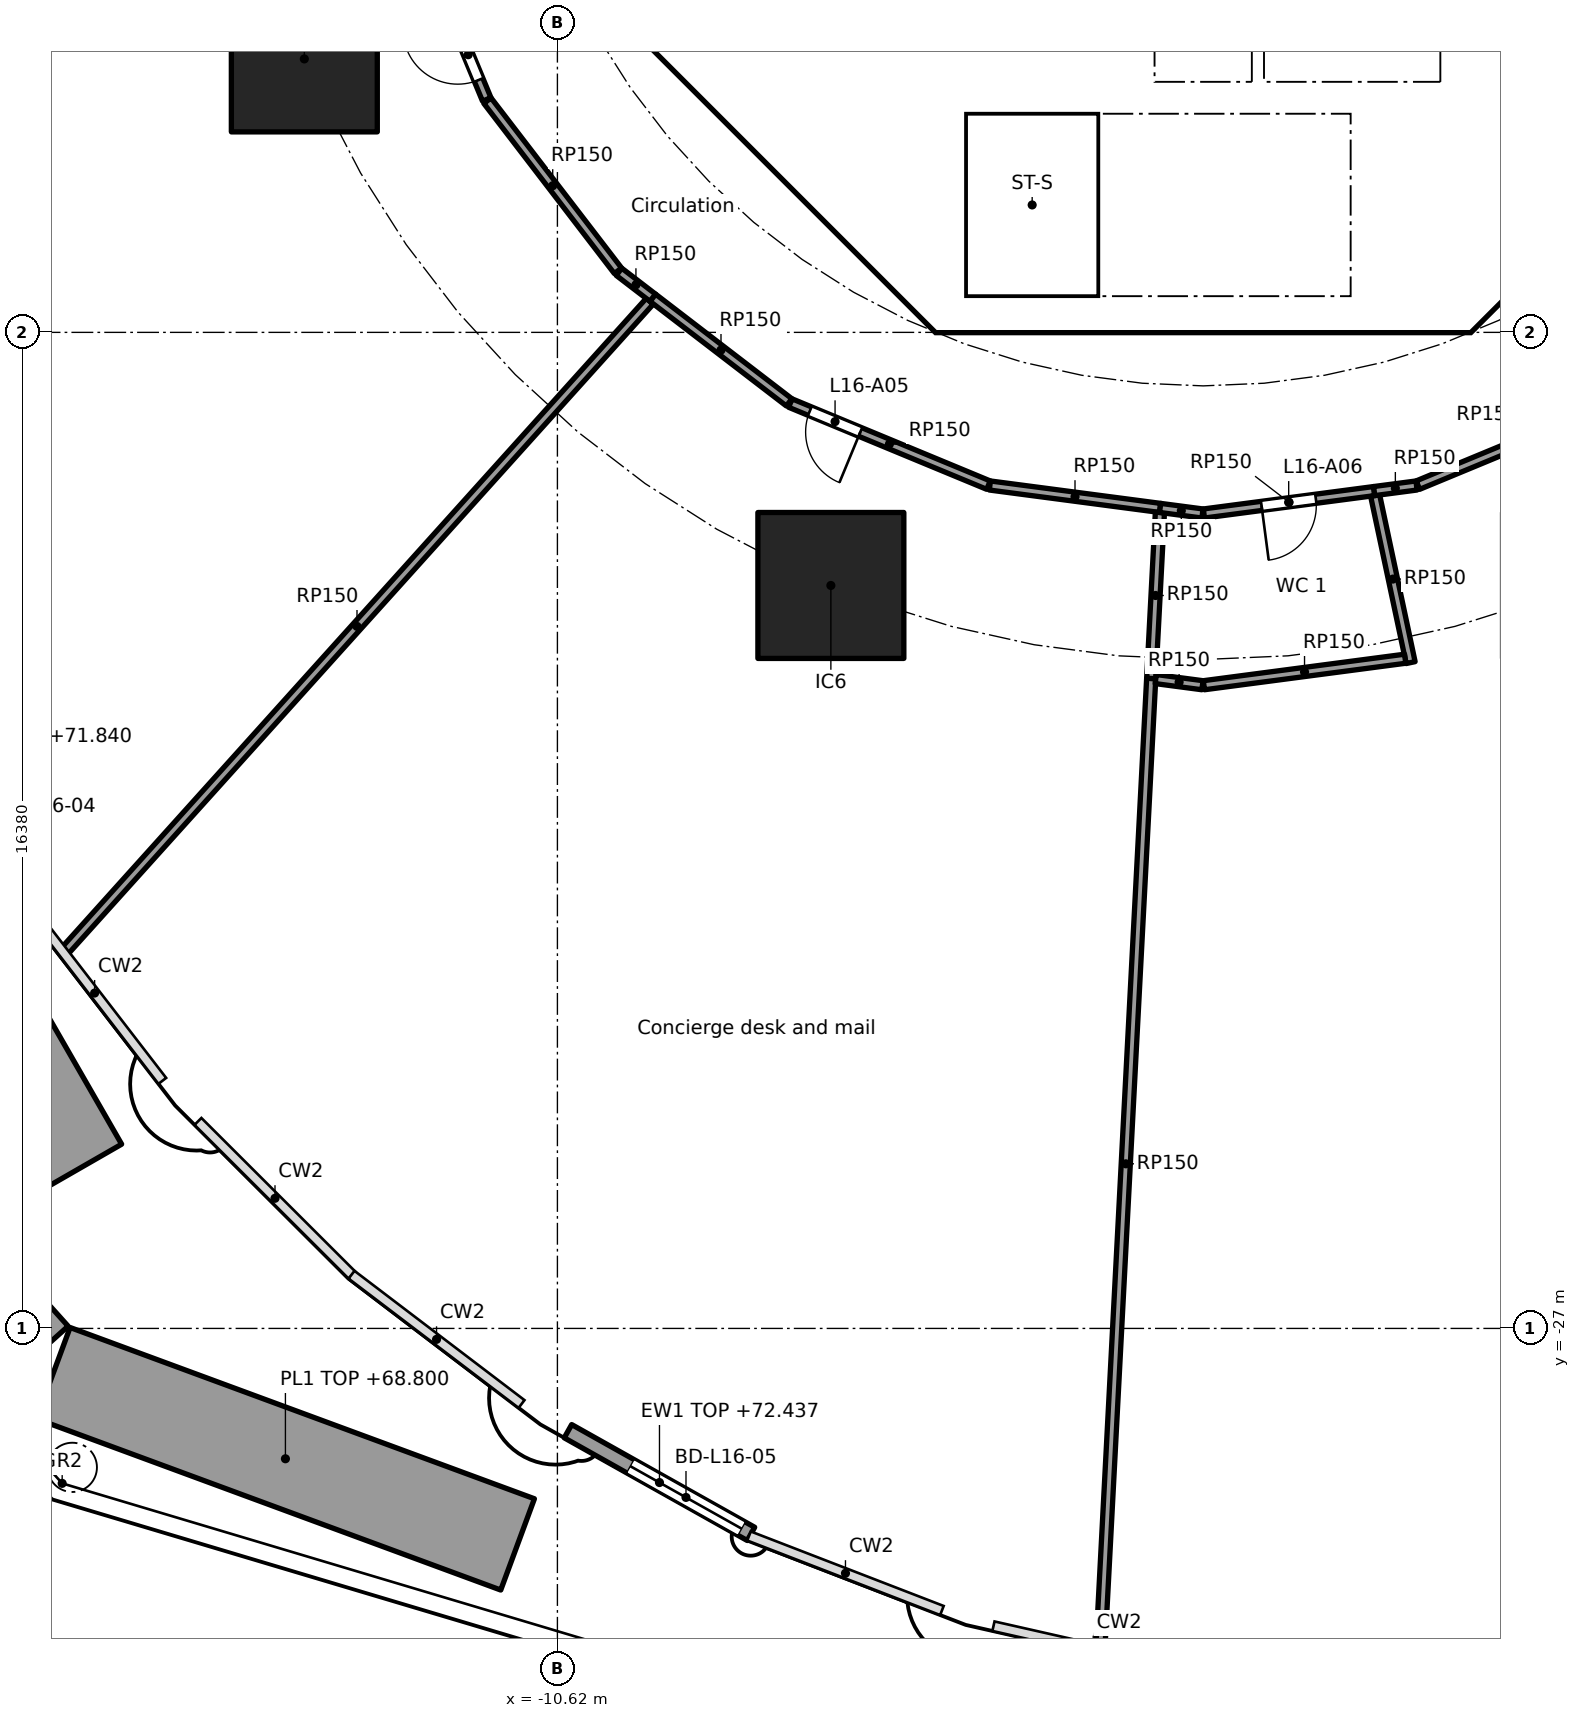
"""IFC4 building model, lengths in metres.
Left out: names, types, materials, properties, quantities, classifications, styles, units other than length and angle.
Written with IfcOpenShell. Run it as: python <this file> out.ifc"""

import sys

from ifc_helpers import new_model, si_unit, direction, frame, frame_2d, origin, origin_2d, place, context, subcontext, project, spatial, polyline, rectangle, outline, extrude, element, fill, save


model = new_model("IFC4")
c1 = context("Model", 3, precision=1e-05, world=origin(), true_north=direction((0.0, 1.0)))
c2 = subcontext(c1, "Body", "Model", "MODEL_VIEW")
j1 = project(units=[si_unit("LENGTHUNIT", "METRE"), si_unit("PLANEANGLEUNIT", "RADIAN")], contexts=[c1])
p1 = place(None, origin())
s1 = spatial("IfcSite", under=j1, at=p1, CompositionType="ELEMENT")
p2 = place(p1, origin())
s2 = spatial("IfcBuilding", under=s1, at=p2, CompositionType="ELEMENT")
p3 = place(p2, frame((0.0, 0.0, 67.7)))
s3 = spatial("IfcBuildingStorey", under=s2, at=p3, CompositionType="ELEMENT", Elevation=67.7)
for number, where, z_axis, x_axis in (
    (1, (-14.782, -6.123, 0.0), (0.0, 0.0, 1.0), (1.0, 0.0, 0.0)),
    (2, (-6.123, -14.782, 0.0), (0.0, 0.0, 1.0), (1.0, 0.0, 0.0)),
):
    element("IfcColumn", number, at=place(p3, frame(where, z_axis=z_axis, x_axis=x_axis)), inside=s3, PredefinedType="COLUMN", context=c2, shape_type="SweptSolid", body=[
        extrude(rectangle(XDim=2.4, YDim=2.4, at=origin_2d()), origin(), (0.0, 0.0, 1.0), 5.6),
    ])
p4 = place(p3, frame((-7.437, -30.379, 0.0), z_axis=(0.0, 0.0, 1.0), x_axis=(-0.872056886807, 0.489404522019, 0.0)))
e3 = element("IfcWall", 3, at=p4, inside=s3, PredefinedType="SOLIDWALL", context=c2, shape_type="SweptSolid", body=[
    extrude(rectangle(XDim=3.451, YDim=0.25, at=frame_2d((1.726, 0.0))), origin(), (0.0, 0.0, 1.0), 4.737),
])
p5 = place(p4, frame((0.176, 0.0, 0.0)))
e4 = element("IfcOpeningElement", 4, at=p5, cuts=e3, PredefinedType="OPENING", context=c2, shape_type="SweptSolid", body=[
    extrude(rectangle(XDim=2.1, YDim=2.4, at=frame_2d((1.05, 1.2))), frame((0.0, 0.135, 0.0), z_axis=(0.0, -1.0, 0.0), x_axis=(1.0, 0.0, 0.0)), (0.0, 0.0, 1.0), 0.27),
])
p6 = place(p3, frame((-20.758, -20.405, 0.0), z_axis=(0.0, 0.0, 1.0), x_axis=(0.498299562328, -0.867004928581, 0.0)))
e5 = element("IfcWall", 5, at=p6, inside=s3, PredefinedType="SOLIDWALL", context=c2, shape_type="SweptSolid", body=[
    extrude(rectangle(XDim=4.572, YDim=1.6, at=frame_2d((2.286, 0.0))), origin(), (0.0, 0.0, 1.0), 1.1),
])
p7 = place(p3, frame((-19.261, -27.497, 0.0), z_axis=(0.0, 0.0, 1.0), x_axis=(-0.668110687062, 0.744061899194, 0.0)))
e6 = element("IfcWall", 6, at=p7, inside=s3, PredefinedType="SOLIDWALL", context=c2, shape_type="SweptSolid", body=[
    extrude(rectangle(XDim=6.573, YDim=1.6, at=frame_2d((3.287, 0.0))), origin(), (0.0, 0.0, 1.0), 1.1),
])
p8 = place(p3, frame((-11.275, -30.552, 0.0), z_axis=(0.0, 0.0, 1.0), x_axis=(-0.938217579565, 0.346045912264, 0.0)))
e7 = element("IfcWall", 7, at=p8, inside=s3, PredefinedType="SOLIDWALL", context=c2, shape_type="SweptSolid", body=[
    extrude(rectangle(XDim=8.139, YDim=1.6, at=frame_2d((4.069, 0.0))), origin(), (0.0, 0.0, 1.0), 1.1),
])
p9 = place(p3, frame((-9.988, -4.613, 0.0), z_axis=(0.0, 0.0, 1.0), x_axis=(0.707106781187, -0.707106781187, 0.0)))
e8 = element("IfcWall", 8, at=p9, inside=s3, PredefinedType="SHEAR", context=c2, shape_type="SweptSolid", body=[
    extrude(rectangle(XDim=7.602, YDim=0.6, at=frame_2d((3.801, 0.0))), origin(), (0.0, 0.0, 1.0), 5.34),
])
p10 = place(p9, frame((6.151, 0.0, 0.0)))
e9 = element("IfcOpeningElement", 9, at=p10, cuts=e8, PredefinedType="OPENING", context=c2, shape_type="SweptSolid", body=[
    extrude(rectangle(XDim=1.1, YDim=2.1, at=frame_2d((0.55, 1.05))), frame((0.0, 0.31, 0.0), z_axis=(0.0, -1.0, 0.0), x_axis=(1.0, 0.0, 0.0)), (0.0, 0.0, 1.0), 0.62),
])
p11 = place(p3, frame((4.613, -9.988, 0.0), z_axis=(0.0, 0.0, 1.0), x_axis=(0.707106781187, 0.707106781187, 0.0)))
e10 = element("IfcWall", 10, at=p11, inside=s3, PredefinedType="SHEAR", context=c2, shape_type="SweptSolid", body=[
    extrude(rectangle(XDim=7.602, YDim=0.6, at=frame_2d((3.801, 0.0))), origin(), (0.0, 0.0, 1.0), 5.34),
])
p12 = place(p11, frame((3.201, 0.0, 0.0)))
e11 = element("IfcOpeningElement", 11, at=p12, cuts=e10, PredefinedType="OPENING", context=c2, shape_type="SweptSolid", body=[
    extrude(rectangle(XDim=1.2, YDim=2.1, at=frame_2d((0.6, 1.05))), frame((0.0, 0.31, 0.0), z_axis=(0.0, -1.0, 0.0), x_axis=(1.0, 0.0, 0.0)), (0.0, 0.0, 1.0), 0.62),
])
p13 = place(p3, frame((4.0, -10.025, 0.0), z_axis=(0.0, 0.0, 1.0), x_axis=(0.0, 1.0, 0.0)))
e12 = element("IfcWall", 12, at=p13, inside=s3, PredefinedType="SOLIDWALL", context=c2, shape_type="SweptSolid", body=[
    extrude(rectangle(XDim=3.0, YDim=0.2, at=frame_2d((1.5, 0.0))), origin(), (0.0, 0.0, 1.0), 5.34),
])
p14 = place(p13, frame((0.975, 0.0, 0.0)))
e13 = element("IfcOpeningElement", 13, at=p14, cuts=e12, PredefinedType="OPENING", context=c2, shape_type="SweptSolid", body=[
    extrude(rectangle(XDim=1.1, YDim=2.1, at=frame_2d((0.55, 1.05))), frame((0.0, 0.11, 0.0), z_axis=(0.0, -1.0, 0.0), x_axis=(1.0, 0.0, 0.0)), (0.0, 0.0, 1.0), 0.22),
])
p15 = place(p3, frame((-7.0, -7.027, 0.0), z_axis=(0.0, 0.0, 1.0), x_axis=(0.0, 1.0, 0.0)))
e14 = element("IfcWall", 14, at=p15, inside=s3, PredefinedType="PARTITIONING", context=c2, shape_type="SweptSolid", body=[
    extrude(rectangle(XDim=2.927, YDim=0.15, at=frame_2d((1.463, 0.0))), origin(), (0.0, 0.0, 1.0), 5.34),
])
p16 = place(p15, frame((0.976, 0.0, 0.0)))
e15 = element("IfcOpeningElement", 15, at=p16, cuts=e14, PredefinedType="OPENING", context=c2, shape_type="SweptSolid", body=[
    extrude(rectangle(XDim=0.9, YDim=2.1, at=frame_2d((0.45, 1.05))), frame((0.0, 0.085, 0.0), z_axis=(0.0, -1.0, 0.0), x_axis=(1.0, 0.0, 0.0)), (0.0, 0.0, 1.0), 0.17),
])
p17 = place(p3, frame((4.0, -6.5, 0.0), z_axis=(0.0, 0.0, 1.0), x_axis=(0.0, 1.0, 0.0)))
e16 = element("IfcWall", 16, at=p17, inside=s3, PredefinedType="SOLIDWALL", context=c2, shape_type="SweptSolid", body=[
    extrude(rectangle(XDim=2.2, YDim=0.2, at=frame_2d((1.1, 0.0))), origin(), (0.0, 0.0, 1.0), 5.34),
])
p18 = place(p17, frame((0.55, 0.0, 0.0)))
e17 = element("IfcOpeningElement", 17, at=p18, cuts=e16, PredefinedType="OPENING", context=c2, shape_type="SweptSolid", body=[
    extrude(rectangle(XDim=1.1, YDim=2.1, at=frame_2d((0.55, 1.05))), frame((0.0, 0.11, 0.0), z_axis=(0.0, -1.0, 0.0), x_axis=(1.0, 0.0, 0.0)), (0.0, 0.0, 1.0), 0.22),
])
p19 = place(p3, frame((-4.0, -6.5, 0.0), z_axis=(0.0, 0.0, 1.0), x_axis=(0.0, 1.0, 0.0)))
e18 = element("IfcWall", 18, at=p19, inside=s3, PredefinedType="SOLIDWALL", context=c2, shape_type="SweptSolid", body=[
    extrude(rectangle(XDim=2.2, YDim=0.2, at=frame_2d((1.1, 0.0))), origin(), (0.0, 0.0, 1.0), 5.34),
])
p20 = place(p19, frame((0.65, 0.0, 0.0)))
e19 = element("IfcOpeningElement", 19, at=p20, cuts=e18, PredefinedType="OPENING", context=c2, shape_type="SweptSolid", body=[
    extrude(rectangle(XDim=0.9, YDim=2.1, at=frame_2d((0.45, 1.05))), frame((0.0, 0.11, 0.0), z_axis=(0.0, -1.0, 0.0), x_axis=(1.0, 0.0, 0.0)), (0.0, 0.0, 1.0), 0.22),
])
p21 = place(p3, origin())
e20 = element("IfcWall", 20, at=p21, inside=s3, PredefinedType="SHEAR", context=c2, shape_type="SweptSolid", body=[
    extrude(outline(polyline([(-4.152, -10.025), (4.152, -10.025), (4.401, -9.776), (4.825, -10.2), (4.401, -10.625), (-4.401, -10.625), (-4.825, -10.2), (-4.401, -9.776), (-4.152, -10.025)])), origin(), (0.0, 0.0, 1.0), 5.34),
])
for number, where, z_axis, x_axis in (
    (21, (-0.9, -6.5, 0.0), (0.0, 0.0, 1.0), (0.0, 1.0, 0.0)),
    (22, (0.9, -6.5, 0.0), (0.0, 0.0, 1.0), (0.0, 1.0, 0.0)),
):
    element("IfcWall", number, at=place(p3, frame(where, z_axis=z_axis, x_axis=x_axis)), inside=s3, PredefinedType="SOLIDWALL", context=c2, shape_type="SweptSolid", body=[
        extrude(rectangle(XDim=2.2, YDim=0.2, at=frame_2d((1.1, 0.0))), origin(), (0.0, 0.0, 1.0), 5.34),
    ])
p22 = place(p3, origin())
e23 = element("IfcWall", 23, at=p22, inside=s3, PredefinedType="SOLIDWALL", context=c2, shape_type="SweptSolid", body=[
    extrude(outline(polyline([(-3.9, -10.025), (-4.1, -10.025), (-4.1, -7.025), (-3.9, -7.025), (-3.9, -10.025)])), origin(), (0.0, 0.0, 1.0), 5.34),
])
p23 = place(p3, origin())
e24 = element("IfcWall", 24, at=p23, inside=s3, PredefinedType="SOLIDWALL", context=c2, shape_type="SweptSolid", body=[
    extrude(outline(polyline([(4.1, -7.025), (-4.1, -7.025), (-4.1, -6.5), (4.1, -6.5), (4.1, -7.025)])), origin(), (0.0, 0.0, 1.0), 5.34),
])
p24 = place(p3, frame((-11.782, -6.789, 0.0), z_axis=(0.0, 0.0, 1.0), x_axis=(-0.382677866108, 0.923881838111, 0.0)))
e25 = element("IfcWall", 25, at=p24, inside=s3, PredefinedType="PARTITIONING", context=c2, shape_type="SweptSolid", body=[
    extrude(rectangle(XDim=3.527, YDim=0.15, at=frame_2d((1.763, 0.0))), origin(), (0.0, 0.0, 1.0), 5.34),
])
p25 = place(p24, frame((0.346, 0.0, 0.0)))
e26 = element("IfcOpeningElement", 26, at=p25, cuts=e25, PredefinedType="OPENING", context=c2, shape_type="SweptSolid", body=[
    extrude(rectangle(XDim=0.9, YDim=2.1, at=frame_2d((0.45, 1.05))), frame((0.0, 0.085, 0.0), z_axis=(0.0, -1.0, 0.0), x_axis=(1.0, 0.0, 0.0)), (0.0, 0.0, 1.0), 0.17),
])
p26 = place(p3, frame((-9.624, -9.607, 0.0), z_axis=(0.0, 0.0, 1.0), x_axis=(-0.608736710054, 0.793372307201, 0.0)))
e27 = element("IfcWall", 27, at=p26, inside=s3, PredefinedType="PARTITIONING", context=c2, shape_type="SweptSolid", body=[
    extrude(rectangle(XDim=3.527, YDim=0.15, at=frame_2d((1.763, 0.0))), origin(), (0.0, 0.0, 1.0), 5.34),
])
p27 = place(p3, frame((-9.101, -10.107, 0.0), z_axis=(0.0, 0.0, 1.0), x_axis=(-0.669132472721, -0.743143144994, 0.0)))
e28 = element("IfcWall", 28, at=p27, inside=s3, PredefinedType="PARTITIONING", context=c2, shape_type="SweptSolid", body=[
    extrude(rectangle(XDim=14.392, YDim=0.15, at=frame_2d((7.196, 0.0))), origin(), (0.0, 0.0, 1.0), 5.34),
])
p28 = place(p3, frame((-9.05, -10.051, 0.0), z_axis=(0.0, 0.0, 1.0), x_axis=(-0.793399175387, 0.608701690893, 0.0)))
e29 = element("IfcWall", 29, at=p28, inside=s3, PredefinedType="PARTITIONING", context=c2, shape_type="SweptSolid", body=[
    extrude(rectangle(XDim=0.702, YDim=0.15, at=frame_2d((0.351, 0.0))), origin(), (0.0, 0.0, 1.0), 5.34),
])
p29 = place(p3, frame((-6.809, -11.771, 0.0), z_axis=(0.0, 0.0, 1.0), x_axis=(-0.793365630445, 0.608745411834, 0.0)))
e30 = element("IfcWall", 30, at=p29, inside=s3, PredefinedType="PARTITIONING", context=c2, shape_type="SweptSolid", body=[
    extrude(rectangle(XDim=2.825, YDim=0.15, at=frame_2d((1.412, 0.0))), origin(), (0.0, 0.0, 1.0), 5.34),
])
p30 = place(p3, frame((-3.531, -13.132, 0.0), z_axis=(0.0, 0.0, 1.0), x_axis=(-0.923881838111, 0.382677866108, 0.0)))
e31 = element("IfcWall", 31, at=p30, inside=s3, PredefinedType="PARTITIONING", context=c2, shape_type="SweptSolid", body=[
    extrude(rectangle(XDim=3.527, YDim=0.15, at=frame_2d((1.763, 0.0))), origin(), (0.0, 0.0, 1.0), 5.34),
])
p31 = place(p30, frame((2.281, 0.0, 0.0)))
e32 = element("IfcOpeningElement", 32, at=p31, cuts=e31, PredefinedType="OPENING", context=c2, shape_type="SweptSolid", body=[
    extrude(rectangle(XDim=0.9, YDim=2.1, at=frame_2d((0.45, 1.05))), frame((0.0, 0.085, 0.0), z_axis=(0.0, -1.0, 0.0), x_axis=(1.0, 0.0, 0.0)), (0.0, 0.0, 1.0), 0.17),
])
p32 = place(p3, frame((-0.855, -16.312, 0.0), z_axis=(0.0, 0.0, 1.0), x_axis=(-0.05232715486, -0.998629995977, 0.0)))
e33 = element("IfcWall", 33, at=p32, inside=s3, PredefinedType="PARTITIONING", context=c2, shape_type="SweptSolid", body=[
    extrude(rectangle(XDim=15.985, YDim=0.15, at=frame_2d((7.992, 0.0))), origin(), (0.0, 0.0, 1.0), 5.34),
])
p33 = place(p3, frame((-0.708, -13.507, 0.0), z_axis=(0.0, 0.0, 1.0), x_axis=(-0.991443994311, 0.130532778046, 0.0)))
e34 = element("IfcWall", 34, at=p33, inside=s3, PredefinedType="PARTITIONING", context=c2, shape_type="SweptSolid", body=[
    extrude(rectangle(XDim=2.824, YDim=0.15, at=frame_2d((1.412, 0.0))), origin(), (0.0, 0.0, 1.0), 5.34),
])
p34 = place(p3, frame((-0.712, -13.582, 0.0), z_axis=(0.0, 0.0, 1.0), x_axis=(-0.052343174033, -0.99862915646, 0.0)))
e35 = element("IfcWall", 35, at=p34, inside=s3, PredefinedType="PARTITIONING", context=c2, shape_type="SweptSolid", body=[
    extrude(rectangle(XDim=2.733, YDim=0.15, at=frame_2d((1.367, 0.0))), origin(), (0.0, 0.0, 1.0), 5.34),
])
p35 = place(p3, frame((-0.012, -16.423, 0.0), z_axis=(0.0, 0.0, 1.0), x_axis=(-0.991462869305, 0.130389335417, 0.0)))
e36 = element("IfcWall", 36, at=p35, inside=s3, PredefinedType="PARTITIONING", context=c2, shape_type="SweptSolid", body=[
    extrude(rectangle(XDim=0.775, YDim=0.15, at=frame_2d((0.388, 0.0))), origin(), (0.0, 0.0, 1.0), 5.34),
])
p36 = place(p3, frame((-0.012, -13.598, 0.0), z_axis=(0.0, 0.0, 1.0), x_axis=(-0.991466123966, 0.130364585024, 0.0)))
e37 = element("IfcWall", 37, at=p36, inside=s3, PredefinedType="PARTITIONING", context=c2, shape_type="SweptSolid", body=[
    extrude(rectangle(XDim=0.702, YDim=0.15, at=frame_2d((0.351, 0.0))), origin(), (0.0, 0.0, 1.0), 5.34),
])
p37 = place(p3, frame((2.812, -13.23, 0.0), z_axis=(0.0, 0.0, 1.0), x_axis=(-0.991445467051, -0.130521591565, 0.0)))
e38 = element("IfcWall", 38, at=p37, inside=s3, PredefinedType="PARTITIONING", context=c2, shape_type="SweptSolid", body=[
    extrude(rectangle(XDim=2.824, YDim=0.15, at=frame_2d((1.412, 0.0))), origin(), (0.0, 0.0, 1.0), 5.34),
])
p38 = place(p37, frame((0.968, 0.0, 0.0)))
e39 = element("IfcOpeningElement", 39, at=p38, cuts=e38, PredefinedType="OPENING", context=c2, shape_type="SweptSolid", body=[
    extrude(rectangle(XDim=0.9, YDim=2.1, at=frame_2d((0.45, 1.05))), frame((0.0, 0.085, 0.0), z_axis=(0.0, -1.0, 0.0), x_axis=(1.0, 0.0, 0.0)), (0.0, 0.0, 1.0), 0.17),
])
p39 = place(p3, frame((2.828, -13.303, 0.0), z_axis=(0.0, 0.0, 1.0), x_axis=(0.207920091501, -0.978145815076, 0.0)))
e40 = element("IfcWall", 40, at=p39, inside=s3, PredefinedType="PARTITIONING", context=c2, shape_type="SweptSolid", body=[
    extrude(rectangle(XDim=2.809, YDim=0.15, at=frame_2d((1.404, 0.0))), origin(), (0.0, 0.0, 1.0), 5.34),
])
p40 = place(p3, frame((3.321, -15.987, 0.0), z_axis=(0.0, 0.0, 1.0), x_axis=(-0.991441844339, -0.130549106827, 0.0)))
e41 = element("IfcWall", 41, at=p40, inside=s3, PredefinedType="PARTITIONING", context=c2, shape_type="SweptSolid", body=[
    extrude(rectangle(XDim=3.338, YDim=0.15, at=frame_2d((1.669, 0.0))), origin(), (0.0, 0.0, 1.0), 5.34),
])
p41 = place(p3, frame((3.508, -13.138, 0.0), z_axis=(0.0, 0.0, 1.0), x_axis=(-0.991460212813, -0.130409533429, 0.0)))
e42 = element("IfcWall", 42, at=p41, inside=s3, PredefinedType="PARTITIONING", context=c2, shape_type="SweptSolid", body=[
    extrude(rectangle(XDim=0.702, YDim=0.15, at=frame_2d((0.351, 0.0))), origin(), (0.0, 0.0, 1.0), 5.34),
])
p42 = place(p3, frame((6.789, -11.782, 0.0), z_axis=(0.0, 0.0, 1.0), x_axis=(-0.923881838111, -0.382677866108, 0.0)))
e43 = element("IfcWall", 43, at=p42, inside=s3, PredefinedType="PARTITIONING", context=c2, shape_type="SweptSolid", body=[
    extrude(rectangle(XDim=3.527, YDim=0.15, at=frame_2d((1.763, 0.0))), origin(), (0.0, 0.0, 1.0), 5.34),
])
p43 = place(p42, frame((0.346, 0.0, 0.0)))
e44 = element("IfcOpeningElement", 44, at=p43, cuts=e43, PredefinedType="OPENING", context=c2, shape_type="SweptSolid", body=[
    extrude(rectangle(XDim=0.9, YDim=2.1, at=frame_2d((0.45, 1.05))), frame((0.0, 0.085, 0.0), z_axis=(0.0, -1.0, 0.0), x_axis=(1.0, 0.0, 0.0)), (0.0, 0.0, 1.0), 0.17),
])
p44 = place(p5, origin())
e45 = element("IfcDoor", 45, at=p44, inside=s3, OperationType="SLIDING_TO_LEFT", PredefinedType="DOOR", context=c2, shape_type="SweptSolid", body=[
    extrude(rectangle(XDim=2.1, YDim=2.4, at=frame_2d((1.05, 1.2))), frame((0.0, 0.025, 0.0), z_axis=(0.0, -1.0, 0.0), x_axis=(1.0, 0.0, 0.0)), (0.0, 0.0, 1.0), 0.05),
])
fill(e4, e45)
p45 = place(p14, origin())
e46 = element("IfcDoor", 46, at=p45, inside=s3, OperationType="SINGLE_SWING_LEFT", PredefinedType="DOOR", context=c2, shape_type="SweptSolid", body=[
    extrude(rectangle(XDim=1.1, YDim=2.1, at=frame_2d((0.55, 1.05))), frame((0.0, 0.025, 0.0), z_axis=(0.0, -1.0, 0.0), x_axis=(1.0, 0.0, 0.0)), (0.0, 0.0, 1.0), 0.05),
])
fill(e13, e46)
p46 = place(p16, origin())
e47 = element("IfcDoor", 47, at=p46, inside=s3, OperationType="SINGLE_SWING_LEFT", PredefinedType="DOOR", context=c2, shape_type="SweptSolid", body=[
    extrude(rectangle(XDim=0.9, YDim=2.1, at=frame_2d((0.45, 1.05))), frame((0.0, 0.025, 0.0), z_axis=(0.0, -1.0, 0.0), x_axis=(1.0, 0.0, 0.0)), (0.0, 0.0, 1.0), 0.05),
])
fill(e15, e47)
p47 = place(p10, origin())
e48 = element("IfcDoor", 48, at=p47, inside=s3, OperationType="SINGLE_SWING_LEFT", PredefinedType="DOOR", context=c2, shape_type="SweptSolid", body=[
    extrude(rectangle(XDim=1.1, YDim=2.1, at=frame_2d((0.55, 1.05))), frame((0.0, 0.025, 0.0), z_axis=(0.0, -1.0, 0.0), x_axis=(1.0, 0.0, 0.0)), (0.0, 0.0, 1.0), 0.05),
])
fill(e9, e48)
p48 = place(p25, origin())
e49 = element("IfcDoor", 49, at=p48, inside=s3, OperationType="SINGLE_SWING_RIGHT", PredefinedType="DOOR", context=c2, shape_type="SweptSolid", body=[
    extrude(rectangle(XDim=0.9, YDim=2.1, at=frame_2d((0.45, 1.05))), frame((0.0, 0.025, 0.0), z_axis=(0.0, -1.0, 0.0), x_axis=(1.0, 0.0, 0.0)), (0.0, 0.0, 1.0), 0.05),
])
fill(e26, e49)
p49 = place(p31, origin())
e50 = element("IfcDoor", 50, at=p49, inside=s3, OperationType="SINGLE_SWING_LEFT", PredefinedType="DOOR", context=c2, shape_type="SweptSolid", body=[
    extrude(rectangle(XDim=0.9, YDim=2.1, at=frame_2d((0.45, 1.05))), frame((0.0, 0.025, 0.0), z_axis=(0.0, -1.0, 0.0), x_axis=(1.0, 0.0, 0.0)), (0.0, 0.0, 1.0), 0.05),
])
fill(e32, e50)
p50 = place(p38, origin())
e51 = element("IfcDoor", 51, at=p50, inside=s3, OperationType="SINGLE_SWING_RIGHT", PredefinedType="DOOR", context=c2, shape_type="SweptSolid", body=[
    extrude(rectangle(XDim=0.9, YDim=2.1, at=frame_2d((0.45, 1.05))), frame((0.0, 0.025, 0.0), z_axis=(0.0, -1.0, 0.0), x_axis=(1.0, 0.0, 0.0)), (0.0, 0.0, 1.0), 0.05),
])
fill(e39, e51)
save(model, sys.argv[1])
